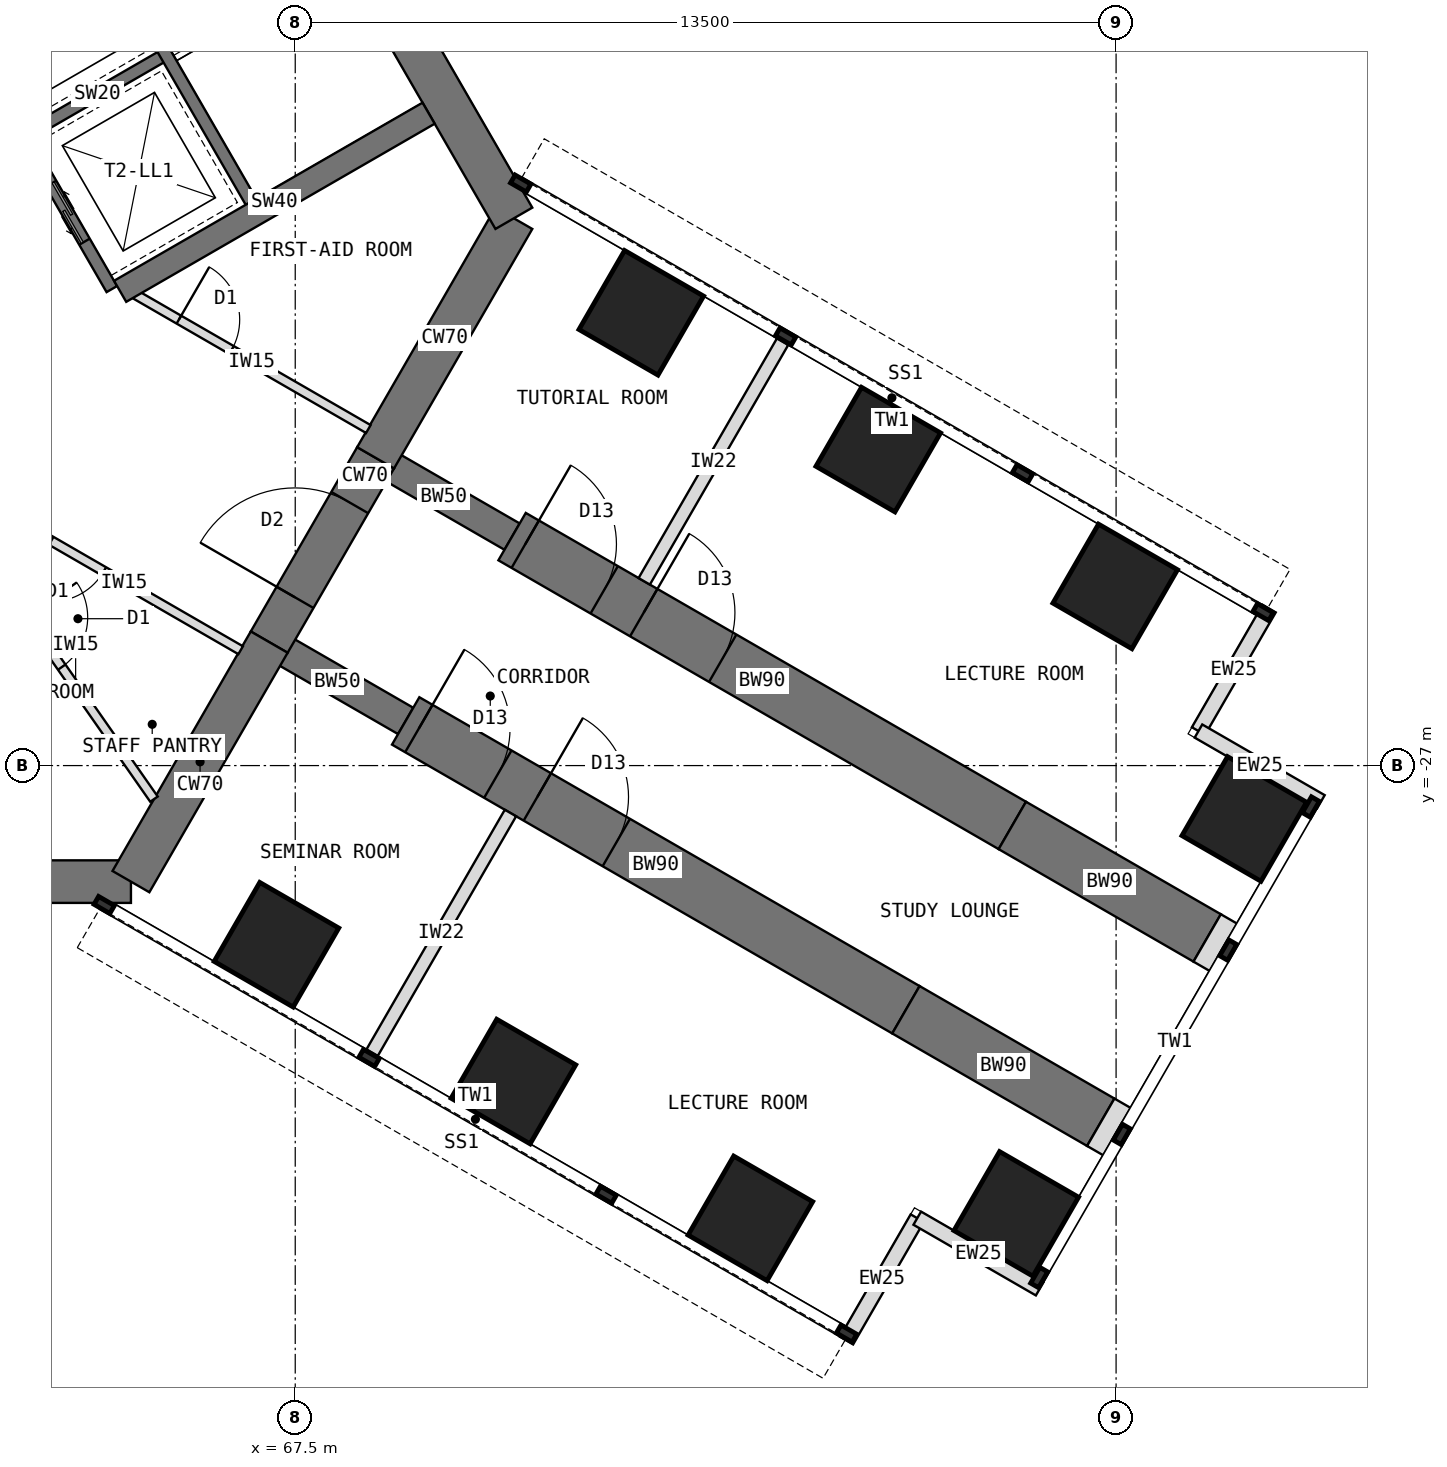
"""IFC4 building model, lengths in metres.
Left out: names, types, materials, properties, quantities, classifications, styles, units other than length and angle.
Written with IfcOpenShell. Run it as: python <this file> out.ifc"""

import sys

from ifc_helpers import new_model, si_unit, direction, frame, frame_2d, origin, origin_2d, place, context, subcontext, project, spatial, rectangle, extrude, element, fill, save


model = new_model("IFC4")
c1 = context("Model", 3, precision=1e-05, world=origin(), true_north=direction((0.0, 1.0)))
c2 = subcontext(c1, "Body", "Model", "MODEL_VIEW")
j1 = project(units=[si_unit("LENGTHUNIT", "METRE"), si_unit("PLANEANGLEUNIT", "RADIAN")], contexts=[c1])
p1 = place(None, origin())
s1 = spatial("IfcSite", under=j1, at=p1, CompositionType="ELEMENT")
p2 = place(p1, origin())
s2 = spatial("IfcBuilding", under=s1, at=p2, CompositionType="ELEMENT")
p3 = place(p2, frame((0.0, 0.0, 36.5)))
s3 = spatial("IfcBuildingStorey", under=s2, at=p3, CompositionType="ELEMENT", Elevation=36.5)
p4 = place(p3, frame((52.202, -28.908, 0.0), z_axis=(0.0, 0.0, 1.0), x_axis=(1.0, 0.0, 0.0)))
e1 = element("IfcWall", 1, at=p4, inside=s3, PredefinedType="SHEAR", context=c2, shape_type="SweptSolid", body=[
    extrude(rectangle(XDim=12.596, YDim=0.7, at=frame_2d((6.298, 0.0))), origin(), (0.0, 0.0, 1.0), 4.0),
])
p5 = place(p3, frame((64.798, -28.908, 0.0), z_axis=(0.0, 0.0, 1.0), x_axis=(0.499984222037, 0.866034513004, 0.0)))
e2 = element("IfcWall", 2, at=p5, inside=s3, PredefinedType="SHEAR", context=c2, shape_type="SweptSolid", body=[
    extrude(rectangle(XDim=4.548, YDim=0.7, at=frame_2d((2.274, 0.0))), origin(), (0.0, 0.0, 1.0), 4.0),
])
p6 = place(p3, frame((67.072, -24.97, 0.0), z_axis=(0.0, 0.0, 1.0), x_axis=(0.500010275428, 0.866019471182, 0.0)))
e3 = element("IfcWall", 3, at=p6, inside=s3, PredefinedType="SHEAR", context=c2, shape_type="SweptSolid", body=[
    extrude(rectangle(XDim=3.5, YDim=0.7, at=frame_2d((1.75, 0.0))), origin(), (0.0, 0.0, 1.0), 4.0),
])
p7 = place(p6, frame((0.85, 0.0, 0.0)))
e4 = element("IfcOpeningElement", 4, at=p7, cuts=e3, PredefinedType="OPENING", context=c2, shape_type="SweptSolid", body=[
    extrude(rectangle(XDim=1.8, YDim=2.1, at=frame_2d((0.9, 1.05))), frame((0.0, 0.36, 0.0), z_axis=(0.0, -1.0, 0.0), x_axis=(1.0, 0.0, 0.0)), (0.0, 0.0, 1.0), 0.72),
])
p8 = place(p3, frame((68.822, -21.939, 0.0), z_axis=(0.0, 0.0, 1.0), x_axis=(0.500024481964, 0.866011268655, 0.0)))
e5 = element("IfcWall", 5, at=p8, inside=s3, PredefinedType="SHEAR", context=c2, shape_type="SweptSolid", body=[
    extrude(rectangle(XDim=4.548, YDim=0.7, at=frame_2d((2.274, 0.0))), origin(), (0.0, 0.0, 1.0), 4.0),
])
p9 = place(p3, frame((71.096, -18.0, 0.0), z_axis=(0.0, 0.0, 1.0), x_axis=(-0.500005998175, 0.866021940709, 0.0)))
e6 = element("IfcWall", 6, at=p9, inside=s3, PredefinedType="SHEAR", context=c2, shape_type="SweptSolid", body=[
    extrude(rectangle(XDim=12.596, YDim=0.7, at=frame_2d((6.298, 0.0))), origin(), (0.0, 0.0, 1.0), 4.0),
])
p10 = place(p3, frame((68.822, -21.939, 0.0), z_axis=(0.0, 0.0, 1.0), x_axis=(0.866072649678, -0.499918158782, 0.0)))
e7 = element("IfcWall", 7, at=p10, inside=s3, PredefinedType="SHEAR", context=c2, shape_type="SweptSolid", body=[
    extrude(rectangle(XDim=2.592, YDim=0.5, at=frame_2d((1.296, 0.0))), origin(), (0.0, 0.0, 1.0), 4.0),
])
p11 = place(p3, frame((71.066, -23.234, 0.0), z_axis=(0.0, 0.0, 1.0), x_axis=(0.86602681393, -0.499997557548, 0.0)))
e8 = element("IfcWall", 8, at=p11, inside=s3, PredefinedType="SHEAR", context=c2, shape_type="SweptSolid", body=[
    extrude(rectangle(XDim=9.5, YDim=0.9, at=frame_2d((4.75, 0.0))), origin(), (0.0, 0.0, 1.0), 4.0),
])
p12 = place(p11, frame((0.25, 0.0, 0.0)))
e9 = element("IfcOpeningElement", 9, at=p12, cuts=e8, PredefinedType="OPENING", context=c2, shape_type="SweptSolid", body=[
    extrude(rectangle(XDim=1.5, YDim=2.1, at=frame_2d((0.75, 1.05))), frame((0.0, 0.46, 0.0), z_axis=(0.0, -1.0, 0.0), x_axis=(1.0, 0.0, 0.0)), (0.0, 0.0, 1.0), 0.92),
])
p13 = place(p11, frame((2.5, 0.0, 0.0)))
e10 = element("IfcOpeningElement", 10, at=p13, cuts=e8, PredefinedType="OPENING", context=c2, shape_type="SweptSolid", body=[
    extrude(rectangle(XDim=1.5, YDim=2.1, at=frame_2d((0.75, 1.05))), frame((0.0, 0.46, 0.0), z_axis=(0.0, -1.0, 0.0), x_axis=(1.0, 0.0, 0.0)), (0.0, 0.0, 1.0), 0.92),
])
p14 = place(p3, frame((79.294, -27.984, 0.0), z_axis=(0.0, 0.0, 1.0), x_axis=(0.866000971088, -0.500042316284, 0.0)))
e11 = element("IfcWall", 11, at=p14, inside=s3, PredefinedType="SHEAR", context=c2, shape_type="SweptSolid", body=[
    extrude(rectangle(XDim=3.7, YDim=0.9, at=frame_2d((1.85, 0.0))), origin(), (0.0, 0.0, 1.0), 4.0),
])
p15 = place(p3, frame((67.072, -24.97, 0.0), z_axis=(0.0, 0.0, 1.0), x_axis=(0.866031863473, -0.499988811324, 0.0)))
e12 = element("IfcWall", 12, at=p15, inside=s3, PredefinedType="SHEAR", context=c2, shape_type="SweptSolid", body=[
    extrude(rectangle(XDim=2.592, YDim=0.5, at=frame_2d((1.296, 0.0))), origin(), (0.0, 0.0, 1.0), 4.0),
])
p16 = place(p3, frame((69.316, -26.266, 0.0), z_axis=(0.0, 0.0, 1.0), x_axis=(0.86602681393, -0.499997557548, 0.0)))
e13 = element("IfcWall", 13, at=p16, inside=s3, PredefinedType="SHEAR", context=c2, shape_type="SweptSolid", body=[
    extrude(rectangle(XDim=9.5, YDim=0.9, at=frame_2d((4.75, 0.0))), origin(), (0.0, 0.0, 1.0), 4.0),
])
p17 = place(p16, frame((0.25, 0.0, 0.0)))
e14 = element("IfcOpeningElement", 14, at=p17, cuts=e13, PredefinedType="OPENING", context=c2, shape_type="SweptSolid", body=[
    extrude(rectangle(XDim=1.5, YDim=2.1, at=frame_2d((0.75, 1.05))), frame((0.0, 0.46, 0.0), z_axis=(0.0, -1.0, 0.0), x_axis=(1.0, 0.0, 0.0)), (0.0, 0.0, 1.0), 0.92),
])
p18 = place(p16, frame((2.5, 0.0, 0.0)))
e15 = element("IfcOpeningElement", 15, at=p18, cuts=e13, PredefinedType="OPENING", context=c2, shape_type="SweptSolid", body=[
    extrude(rectangle(XDim=1.5, YDim=2.1, at=frame_2d((0.75, 1.05))), frame((0.0, 0.46, 0.0), z_axis=(0.0, -1.0, 0.0), x_axis=(1.0, 0.0, 0.0)), (0.0, 0.0, 1.0), 0.92),
])
p19 = place(p3, frame((77.544, -31.016, 0.0), z_axis=(0.0, 0.0, 1.0), x_axis=(0.866029545028, -0.499992827086, 0.0)))
e16 = element("IfcWall", 16, at=p19, inside=s3, PredefinedType="SHEAR", context=c2, shape_type="SweptSolid", body=[
    extrude(rectangle(XDim=3.7, YDim=0.9, at=frame_2d((1.85, 0.0))), origin(), (0.0, 0.0, 1.0), 4.0),
])
for number, where, z_axis, x_axis in (
    (17, (73.191, -19.554, 0.0), (0.0, 0.0, 1.0), (0.5, 0.866, 0.0)),
    (18, (67.191, -29.946, 0.0), (0.0, 0.0, 1.0), (0.5, 0.866, 0.0)),
    (19, (77.088, -21.804, 0.0), (0.0, 0.0, 1.0), (0.5, 0.866, 0.0)),
    (20, (71.088, -32.196, 0.0), (0.0, 0.0, 1.0), (0.5, 0.866, 0.0)),
    (21, (80.986, -24.054, 0.0), (0.0, 0.0, 1.0), (0.5, 0.866, 0.0)),
    (22, (74.986, -34.446, 0.0), (0.0, 0.0, 1.0), (0.5, 0.866, 0.0)),
    (23, (83.108, -27.877, 0.0), (0.0, 0.0, 1.0), (0.5, 0.866, 0.0)),
    (24, (79.358, -34.373, 0.0), (0.0, 0.0, 1.0), (0.5, 0.866, 0.0)),
):
    element("IfcColumn", number, at=place(p3, frame(where, z_axis=z_axis, x_axis=x_axis)), inside=s3, PredefinedType="COLUMN", context=c2, shape_type="SweptSolid", body=[
        extrude(rectangle(XDim=1.5, YDim=1.5, at=origin_2d()), origin(), (0.0, 0.0, 1.0), 4.0),
    ])
for number, where, z_axis, x_axis in (
    (25, (83.517, -24.419, 0.0), (0.0, 0.0, 1.0), (-0.5, -0.866, 0.0)),
    (26, (82.355, -26.432, 0.0), (0.0, 0.0, 1.0), (0.866, -0.5, 0.0)),
    (27, (76.567, -36.456, 0.0), (0.0, 0.0, 1.0), (0.5, 0.866, 0.0)),
    (28, (77.73, -34.443, 0.0), (0.0, 0.0, 1.0), (0.866, -0.5, 0.0)),
):
    element("IfcWall", number, at=place(p3, frame(where, z_axis=z_axis, x_axis=x_axis)), inside=s3, PredefinedType="STANDARD", context=c2, shape_type="SweptSolid", body=[
        extrude(rectangle(XDim=2.325, YDim=0.25, at=frame_2d((1.163, 0.0))), origin(), (0.0, 0.0, 1.0), 3.8),
    ])
for number, where, z_axis, x_axis in (
    (29, (82.498, -29.834, 0.0), (0.0, 0.0, 1.0), (0.866, -0.5, 0.0)),
    (30, (80.748, -32.865, 0.0), (0.0, 0.0, 1.0), (0.866, -0.5, 0.0)),
):
    element("IfcWall", number, at=place(p3, frame(where, z_axis=z_axis, x_axis=x_axis)), inside=s3, PredefinedType="PARTITIONING", context=c2, shape_type="SweptSolid", body=[
        extrude(rectangle(XDim=0.31, YDim=0.9, at=frame_2d((0.155, 0.0))), origin(), (0.0, 0.0, 1.0), 3.8),
    ])
p20 = place(p3, frame((64.484, -19.164, 0.0), z_axis=(0.0, 0.0, 1.0), x_axis=(-0.49999894854, 0.866026010844, 0.0)))
e31 = element("IfcWall", 31, at=p20, inside=s3, PredefinedType="SHEAR", context=c2, shape_type="SweptSolid", body=[
    extrude(rectangle(XDim=8.0, YDim=0.2, at=frame_2d((4.0, 0.0))), origin(), (0.0, 0.0, 1.0), 4.0),
])
p21 = place(p20, frame((6.3, 0.0, 0.0)))
e32 = element("IfcOpeningElement", 32, at=p21, cuts=e31, PredefinedType="OPENING", context=c2, shape_type="SweptSolid", body=[
    extrude(rectangle(XDim=1.2, YDim=2.1, at=frame_2d((0.6, 1.05))), frame((0.0, 0.11, 0.0), z_axis=(0.0, -1.0, 0.0), x_axis=(1.0, 0.0, 0.0)), (0.0, 0.0, 1.0), 0.22),
])
p22 = place(p20, frame((0.9, 0.0, 0.0)))
e33 = element("IfcOpeningElement", 33, at=p22, cuts=e31, PredefinedType="OPENING", context=c2, shape_type="SweptSolid", body=[
    extrude(rectangle(XDim=1.1, YDim=2.2, at=frame_2d((0.55, 1.1))), frame((0.0, 0.11, 0.0), z_axis=(0.0, -1.0, 0.0), x_axis=(1.0, 0.0, 0.0)), (0.0, 0.0, 1.0), 0.22),
])
p23 = place(p20, frame((3.8, 0.0, 0.0)))
e34 = element("IfcOpeningElement", 34, at=p23, cuts=e31, PredefinedType="OPENING", context=c2, shape_type="SweptSolid", body=[
    extrude(rectangle(XDim=1.1, YDim=2.2, at=frame_2d((0.55, 1.1))), frame((0.0, 0.11, 0.0), z_axis=(0.0, -1.0, 0.0), x_axis=(1.0, 0.0, 0.0)), (0.0, 0.0, 1.0), 0.22),
])
p24 = place(p3, frame((63.12, -16.603, 0.0), z_axis=(0.0, 0.0, 1.0), x_axis=(0.866062058628, 0.499936506574, 0.0)))
e35 = element("IfcWall", 35, at=p24, inside=s3, PredefinedType="SHEAR", context=c2, shape_type="SweptSolid", body=[
    extrude(rectangle(XDim=2.6, YDim=0.2, at=frame_2d((1.3, 0.0))), origin(), (0.0, 0.0, 1.0), 4.0),
])
p25 = place(p3, frame((66.822, -17.814, 0.0), z_axis=(0.0, 0.0, 1.0), x_axis=(-0.49999894854, 0.866026010844, 0.0)))
e36 = element("IfcWall", 36, at=p25, inside=s3, PredefinedType="SHEAR", context=c2, shape_type="SweptSolid", body=[
    extrude(rectangle(XDim=8.0, YDim=0.2, at=frame_2d((4.0, 0.0))), origin(), (0.0, 0.0, 1.0), 4.0),
])
p26 = place(p25, frame((6.7, 0.0, 0.0)))
e37 = element("IfcOpeningElement", 37, at=p26, cuts=e36, PredefinedType="OPENING", context=c2, shape_type="SweptSolid", body=[
    extrude(rectangle(XDim=1.1, YDim=2.1, at=frame_2d((0.55, 1.05))), frame((0.0, 0.11, 0.0), z_axis=(0.0, -1.0, 0.0), x_axis=(1.0, 0.0, 0.0)), (0.0, 0.0, 1.0), 0.22),
])
p27 = place(p3, frame((64.62, -19.201, 0.0), z_axis=(0.0, 0.0, 1.0), x_axis=(0.866023886965, 0.500002627198, 0.0)))
e38 = element("IfcWall", 38, at=p27, inside=s3, PredefinedType="SHEAR", context=c2, shape_type="SweptSolid", body=[
    extrude(rectangle(XDim=5.858, YDim=0.4, at=frame_2d((2.929, 0.0))), origin(), (0.0, 0.0, 1.0), 4.0),
])
for number, where, z_axis, x_axis in (
    (39, (73.24, -23.97, 0.0), (0.0, 0.0, 1.0), (0.5, 0.866, 0.0)),
    (40, (71.04, -27.78, 0.0), (0.0, 0.0, 1.0), (-0.5, -0.866, 0.0)),
):
    element("IfcWall", number, at=place(p3, frame(where, z_axis=z_axis, x_axis=x_axis)), inside=s3, PredefinedType="PARTITIONING", context=c2, shape_type="SweptSolid", body=[
        extrude(rectangle(XDim=4.55, YDim=0.215, at=frame_2d((2.275, 0.0))), origin(), (0.0, 0.0, 1.0), 3.8),
    ])
p28 = place(p3, frame((64.87, -19.253, 0.0), z_axis=(0.0, 0.0, 1.0), x_axis=(0.866021148949, -0.500007369519, 0.0)))
e41 = element("IfcWall", 41, at=p28, inside=s3, PredefinedType="PARTITIONING", context=c2, shape_type="SweptSolid", body=[
    extrude(rectangle(XDim=4.426, YDim=0.15, at=frame_2d((2.213, 0.0))), origin(), (0.0, 0.0, 1.0), 3.8),
])
p29 = place(p28, frame((0.828, 0.0, 0.0)))
e42 = element("IfcOpeningElement", 42, at=p29, cuts=e41, PredefinedType="OPENING", context=c2, shape_type="SweptSolid", body=[
    extrude(rectangle(XDim=1.0, YDim=2.1, at=frame_2d((0.5, 1.05))), frame((0.0, 0.085, 0.0), z_axis=(0.0, -1.0, 0.0), x_axis=(1.0, 0.0, 0.0)), (0.0, 0.0, 1.0), 0.17),
])
p30 = place(p3, frame((66.603, -25.103, 0.0), z_axis=(0.0, 0.0, 1.0), x_axis=(-0.866021148949, 0.500007369519, 0.0)))
e43 = element("IfcWall", 43, at=p30, inside=s3, PredefinedType="PARTITIONING", context=c2, shape_type="SweptSolid", body=[
    extrude(rectangle(XDim=4.426, YDim=0.15, at=frame_2d((2.213, 0.0))), origin(), (0.0, 0.0, 1.0), 3.8),
])
p31 = place(p30, frame((2.598, 0.0, 0.0)))
e44 = element("IfcOpeningElement", 44, at=p31, cuts=e43, PredefinedType="OPENING", context=c2, shape_type="SweptSolid", body=[
    extrude(rectangle(XDim=1.0, YDim=2.1, at=frame_2d((0.5, 1.05))), frame((0.0, 0.085, 0.0), z_axis=(0.0, -1.0, 0.0), x_axis=(1.0, 0.0, 0.0)), (0.0, 0.0, 1.0), 0.17),
])
p32 = place(p3, frame((62.6, -23.865, 0.0), z_axis=(0.0, 0.0, 1.0), x_axis=(0.572915783016, -0.819614241928, 0.0)))
e45 = element("IfcWall", 45, at=p32, inside=s3, PredefinedType="PARTITIONING", context=c2, shape_type="SweptSolid", body=[
    extrude(rectangle(XDim=4.498, YDim=0.15, at=frame_2d((2.249, 0.0))), origin(), (0.0, 0.0, 1.0), 3.8),
])
p33 = place(p32, frame((0.849, 0.0, 0.0)))
e46 = element("IfcOpeningElement", 46, at=p33, cuts=e45, PredefinedType="OPENING", context=c2, shape_type="SweptSolid", body=[
    extrude(rectangle(XDim=1.0, YDim=2.1, at=frame_2d((0.5, 1.05))), frame((0.0, 0.085, 0.0), z_axis=(0.0, -1.0, 0.0), x_axis=(1.0, 0.0, 0.0)), (0.0, 0.0, 1.0), 0.17),
])
p34 = place(p22, origin())
e47 = element("IfcDoor", 47, at=p34, inside=s3, OperationType="DOUBLE_DOOR_SLIDING", PredefinedType="DOOR", context=c2, shape_type="SweptSolid", body=[
    extrude(rectangle(XDim=1.1, YDim=2.2, at=frame_2d((0.55, 1.1))), frame((0.0, 0.025, 0.0), z_axis=(0.0, -1.0, 0.0), x_axis=(1.0, 0.0, 0.0)), (0.0, 0.0, 1.0), 0.05),
])
fill(e33, e47)
p35 = place(p7, origin())
e48 = element("IfcDoor", 48, at=p35, inside=s3, OperationType="DOUBLE_DOOR_DOUBLE_SWING", PredefinedType="DOOR", context=c2, shape_type="SweptSolid", body=[
    extrude(rectangle(XDim=1.72, YDim=2.06, at=frame_2d((0.9, 1.03))), frame((0.0, 0.025, 0.0), z_axis=(0.0, -1.0, 0.0), x_axis=(1.0, 0.0, 0.0)), (0.0, 0.0, 1.0), 0.05),
    extrude(rectangle(XDim=0.04, YDim=2.1, at=frame_2d((0.02, 1.05))), frame((0.0, 0.35, 0.0), z_axis=(0.0, -1.0, 0.0), x_axis=(1.0, 0.0, 0.0)), (0.0, 0.0, 1.0), 0.699),
    extrude(rectangle(XDim=0.04, YDim=2.1, at=frame_2d((1.78, 1.05))), frame((0.0, 0.35, 0.0), z_axis=(0.0, -1.0, 0.0), x_axis=(1.0, 0.0, 0.0)), (0.0, 0.0, 1.0), 0.699),
    extrude(rectangle(XDim=1.72, YDim=0.04, at=frame_2d((0.9, 2.08))), frame((0.0, 0.35, 0.0), z_axis=(0.0, -1.0, 0.0), x_axis=(1.0, 0.0, 0.0)), (0.0, 0.0, 1.0), 0.699),
])
fill(e4, e48)
p36 = place(p33, origin())
e49 = element("IfcDoor", 49, at=p36, inside=s3, OperationType="SINGLE_SWING_LEFT", PredefinedType="DOOR", context=c2, shape_type="SweptSolid", body=[
    extrude(rectangle(XDim=1.0, YDim=2.1, at=frame_2d((0.5, 1.05))), frame((0.0, 0.025, 0.0), z_axis=(0.0, -1.0, 0.0), x_axis=(1.0, 0.0, 0.0)), (0.0, 0.0, 1.0), 0.05),
])
fill(e46, e49)
p37 = place(p31, origin())
e50 = element("IfcDoor", 50, at=p37, inside=s3, OperationType="SINGLE_SWING_RIGHT", PredefinedType="DOOR", context=c2, shape_type="SweptSolid", body=[
    extrude(rectangle(XDim=1.0, YDim=2.1, at=frame_2d((0.5, 1.05))), frame((0.0, 0.025, 0.0), z_axis=(0.0, -1.0, 0.0), x_axis=(1.0, 0.0, 0.0)), (0.0, 0.0, 1.0), 0.05),
])
fill(e44, e50)
p38 = place(p29, origin())
e51 = element("IfcDoor", 51, at=p38, inside=s3, OperationType="SINGLE_SWING_LEFT", PredefinedType="DOOR", context=c2, shape_type="SweptSolid", body=[
    extrude(rectangle(XDim=1.0, YDim=2.1, at=frame_2d((0.5, 1.05))), frame((0.0, 0.025, 0.0), z_axis=(0.0, -1.0, 0.0), x_axis=(1.0, 0.0, 0.0)), (0.0, 0.0, 1.0), 0.05),
])
fill(e42, e51)
p39 = place(p12, origin())
e52 = element("IfcDoor", 52, at=p39, inside=s3, OperationType="DOUBLE_DOOR_SINGLE_SWING", PredefinedType="DOOR", context=c2, shape_type="SweptSolid", body=[
    extrude(rectangle(XDim=1.42, YDim=2.06, at=frame_2d((0.75, 1.03))), frame((0.0, 0.025, 0.0), z_axis=(0.0, -1.0, 0.0), x_axis=(1.0, 0.0, 0.0)), (0.0, 0.0, 1.0), 0.05),
    extrude(rectangle(XDim=0.04, YDim=2.1, at=frame_2d((0.02, 1.05))), frame((0.0, 0.45, 0.0), z_axis=(0.0, -1.0, 0.0), x_axis=(1.0, 0.0, 0.0)), (0.0, 0.0, 1.0), 0.899),
    extrude(rectangle(XDim=0.04, YDim=2.1, at=frame_2d((1.48, 1.05))), frame((0.0, 0.45, 0.0), z_axis=(0.0, -1.0, 0.0), x_axis=(1.0, 0.0, 0.0)), (0.0, 0.0, 1.0), 0.899),
    extrude(rectangle(XDim=1.42, YDim=0.04, at=frame_2d((0.75, 2.08))), frame((0.0, 0.45, 0.0), z_axis=(0.0, -1.0, 0.0), x_axis=(1.0, 0.0, 0.0)), (0.0, 0.0, 1.0), 0.899),
])
fill(e9, e52)
p40 = place(p13, origin())
e53 = element("IfcDoor", 53, at=p40, inside=s3, OperationType="DOUBLE_DOOR_SINGLE_SWING", PredefinedType="DOOR", context=c2, shape_type="SweptSolid", body=[
    extrude(rectangle(XDim=1.42, YDim=2.06, at=frame_2d((0.75, 1.03))), frame((0.0, 0.025, 0.0), z_axis=(0.0, -1.0, 0.0), x_axis=(1.0, 0.0, 0.0)), (0.0, 0.0, 1.0), 0.05),
    extrude(rectangle(XDim=0.04, YDim=2.1, at=frame_2d((0.02, 1.05))), frame((0.0, 0.45, 0.0), z_axis=(0.0, -1.0, 0.0), x_axis=(1.0, 0.0, 0.0)), (0.0, 0.0, 1.0), 0.899),
    extrude(rectangle(XDim=0.04, YDim=2.1, at=frame_2d((1.48, 1.05))), frame((0.0, 0.45, 0.0), z_axis=(0.0, -1.0, 0.0), x_axis=(1.0, 0.0, 0.0)), (0.0, 0.0, 1.0), 0.899),
    extrude(rectangle(XDim=1.42, YDim=0.04, at=frame_2d((0.75, 2.08))), frame((0.0, 0.45, 0.0), z_axis=(0.0, -1.0, 0.0), x_axis=(1.0, 0.0, 0.0)), (0.0, 0.0, 1.0), 0.899),
])
fill(e10, e53)
p41 = place(p17, origin())
e54 = element("IfcDoor", 54, at=p41, inside=s3, OperationType="DOUBLE_DOOR_SINGLE_SWING", PredefinedType="DOOR", context=c2, shape_type="SweptSolid", body=[
    extrude(rectangle(XDim=1.42, YDim=2.06, at=frame_2d((0.75, 1.03))), frame((0.0, 0.025, 0.0), z_axis=(0.0, -1.0, 0.0), x_axis=(1.0, 0.0, 0.0)), (0.0, 0.0, 1.0), 0.05),
    extrude(rectangle(XDim=0.04, YDim=2.1, at=frame_2d((0.02, 1.05))), frame((0.0, 0.45, 0.0), z_axis=(0.0, -1.0, 0.0), x_axis=(1.0, 0.0, 0.0)), (0.0, 0.0, 1.0), 0.899),
    extrude(rectangle(XDim=0.04, YDim=2.1, at=frame_2d((1.48, 1.05))), frame((0.0, 0.45, 0.0), z_axis=(0.0, -1.0, 0.0), x_axis=(1.0, 0.0, 0.0)), (0.0, 0.0, 1.0), 0.899),
    extrude(rectangle(XDim=1.42, YDim=0.04, at=frame_2d((0.75, 2.08))), frame((0.0, 0.45, 0.0), z_axis=(0.0, -1.0, 0.0), x_axis=(1.0, 0.0, 0.0)), (0.0, 0.0, 1.0), 0.899),
])
fill(e14, e54)
p42 = place(p18, origin())
e55 = element("IfcDoor", 55, at=p42, inside=s3, OperationType="DOUBLE_DOOR_SINGLE_SWING", PredefinedType="DOOR", context=c2, shape_type="SweptSolid", body=[
    extrude(rectangle(XDim=1.42, YDim=2.06, at=frame_2d((0.75, 1.03))), frame((0.0, 0.025, 0.0), z_axis=(0.0, -1.0, 0.0), x_axis=(1.0, 0.0, 0.0)), (0.0, 0.0, 1.0), 0.05),
    extrude(rectangle(XDim=0.04, YDim=2.1, at=frame_2d((0.02, 1.05))), frame((0.0, 0.45, 0.0), z_axis=(0.0, -1.0, 0.0), x_axis=(1.0, 0.0, 0.0)), (0.0, 0.0, 1.0), 0.899),
    extrude(rectangle(XDim=0.04, YDim=2.1, at=frame_2d((1.48, 1.05))), frame((0.0, 0.45, 0.0), z_axis=(0.0, -1.0, 0.0), x_axis=(1.0, 0.0, 0.0)), (0.0, 0.0, 1.0), 0.899),
    extrude(rectangle(XDim=1.42, YDim=0.04, at=frame_2d((0.75, 2.08))), frame((0.0, 0.45, 0.0), z_axis=(0.0, -1.0, 0.0), x_axis=(1.0, 0.0, 0.0)), (0.0, 0.0, 1.0), 0.899),
])
fill(e15, e55)
save(model, sys.argv[1])
